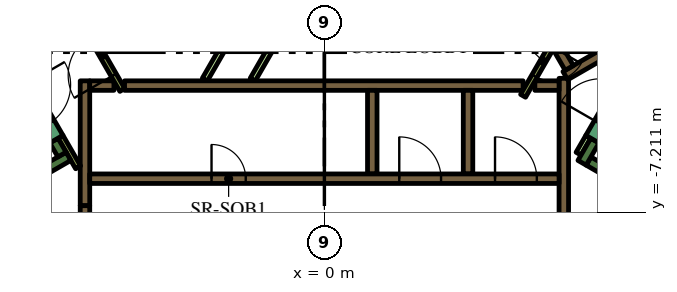
"""IFC4 building model, lengths in metres.
Left out: names, types, materials, properties, quantities, classifications, styles, units other than length and angle.
Written with IfcOpenShell. Run it as: python <this file> out.ifc"""

import sys

from ifc_helpers import new_model, si_unit, direction, frame, frame_2d, origin, place, context, subcontext, project, spatial, rectangle, extrude, element, fill, save


model = new_model("IFC4")
c1 = context("Model", 3, precision=1e-05, world=origin(), true_north=direction((0.0, 1.0)))
c2 = subcontext(c1, "Body", "Model", "MODEL_VIEW")
j1 = project(units=[si_unit("LENGTHUNIT", "METRE"), si_unit("PLANEANGLEUNIT", "RADIAN")], contexts=[c1])
p1 = place(None, origin())
s1 = spatial("IfcSite", under=j1, at=p1, CompositionType="ELEMENT")
p2 = place(p1, origin())
s2 = spatial("IfcBuilding", under=s1, at=p2, CompositionType="ELEMENT")
p3 = place(p2, frame((0.0, 0.0, 74.4)))
s3 = spatial("IfcBuildingStorey", under=s2, at=p3, CompositionType="ELEMENT", Elevation=74.4)
p4 = place(p3, frame((6.461, 13.909, 0.0), z_axis=(0.0, 0.0, 1.0), x_axis=(0.500005804227, -0.866022052686, 0.0)))
e1 = element("IfcWall", 1, at=p4, inside=s3, PredefinedType="SOLIDWALL", context=c2, shape_type="SweptSolid", body=[
    extrude(rectangle(XDim=20.834, YDim=0.9, at=frame_2d((10.417, 0.0))), origin(), (0.0, 0.0, 1.0), 3.9),
])
p5 = place(p3, frame((12.84, -9.261, 0.0), z_axis=(0.0, 0.0, 1.0), x_axis=(-0.866013990052, 0.500019768644, 0.0)))
e2 = element("IfcWall", 2, at=p5, inside=s3, PredefinedType="SOLIDWALL", context=c2, shape_type="SweptSolid", body=[
    extrude(rectangle(XDim=6.8, YDim=0.25, at=frame_2d((3.4, 0.0))), origin(), (0.0, 0.0, 1.0), 3.9),
])
p6 = place(p3, frame((6.78, -5.906, 0.0), z_axis=(0.0, 0.0, 1.0), x_axis=(0.500223362819, 0.865896406789, 0.0)))
e3 = element("IfcWall", 3, at=p6, inside=s3, PredefinedType="SOLIDWALL", context=c2, shape_type="SweptSolid", body=[
    extrude(rectangle(XDim=0.675, YDim=0.25, at=frame_2d((0.337, 0.0))), origin(), (0.0, 0.0, 1.0), 3.9),
])
p7 = place(p3, frame((-12.84, -9.261, 0.0), z_axis=(0.0, 0.0, 1.0), x_axis=(0.866016039709, 0.500016218704, 0.0)))
e4 = element("IfcWall", 4, at=p7, inside=s3, PredefinedType="SOLIDWALL", context=c2, shape_type="SweptSolid", body=[
    extrude(rectangle(XDim=7.05, YDim=0.25, at=frame_2d((3.525, 0.0))), origin(), (0.0, 0.0, 1.0), 3.9),
])
p8 = place(p3, frame((-6.905, -5.69, 0.0), z_axis=(0.0, 0.0, 1.0), x_axis=(-0.500402024738, 0.865793170242, 0.0)))
e5 = element("IfcWall", 5, at=p8, inside=s3, PredefinedType="SOLIDWALL", context=c2, shape_type="SweptSolid", body=[
    extrude(rectangle(XDim=0.425, YDim=0.25, at=frame_2d((0.212, 0.0))), origin(), (0.0, 0.0, 1.0), 3.9),
])
p9 = place(p3, frame((-5.259, -3.875, 0.0), z_axis=(0.0, 0.0, 1.0), x_axis=(1.0, 0.0, 0.0)))
e6 = element("IfcWall", 6, at=p9, inside=s3, PredefinedType="SOLIDWALL", context=c2, shape_type="SweptSolid", body=[
    extrude(rectangle(XDim=10.489, YDim=0.25, at=frame_2d((5.244, 0.0))), origin(), (0.0, 0.0, 1.0), 3.9),
])
for number, where, z_axis, x_axis in (
    (7, (3.78, -4.0, 0.0), (0.0, 0.0, 1.0), (0.0, -1.0, 0.0)),
    (8, (1.26, -4.0, 0.0), (0.0, 0.0, 1.0), (0.0, -1.0, 0.0)),
):
    element("IfcWall", number, at=place(p3, frame(where, z_axis=z_axis, x_axis=x_axis)), inside=s3, PredefinedType="SOLIDWALL", context=c2, shape_type="SweptSolid", body=[
        extrude(rectangle(XDim=2.2, YDim=0.25, at=frame_2d((1.1, 0.0))), origin(), (0.0, 0.0, 1.0), 3.9),
    ])
p10 = place(p3, frame((-6.3, -7.035, 0.0), z_axis=(0.0, 0.0, 1.0), x_axis=(0.0, 1.0, 0.0)))
e9 = element("IfcWall", 9, at=p10, inside=s3, PredefinedType="SOLIDWALL", context=c2, shape_type="SweptSolid", body=[
    extrude(rectangle(XDim=3.285, YDim=0.25, at=frame_2d((1.643, 0.0))), origin(), (0.0, 0.0, 1.0), 3.9),
])
p11 = place(p3, frame((-6.175, -3.875, 0.0), z_axis=(0.0, 0.0, 1.0), x_axis=(1.0, 0.0, 0.0)))
e10 = element("IfcWall", 10, at=p11, inside=s3, PredefinedType="SOLIDWALL", context=c2, shape_type="SweptSolid", body=[
    extrude(rectangle(XDim=0.637, YDim=0.25, at=frame_2d((0.318, 0.0))), origin(), (0.0, 0.0, 1.0), 3.9),
])
p12 = place(p3, frame((6.3, -7.27, 0.0), z_axis=(0.0, 0.0, 1.0), x_axis=(0.0, 1.0, 0.0)))
e11 = element("IfcWall", 11, at=p12, inside=s3, PredefinedType="SOLIDWALL", context=c2, shape_type="SweptSolid", body=[
    extrude(rectangle(XDim=3.586, YDim=0.25, at=frame_2d((1.793, 0.0))), origin(), (0.0, 0.0, 1.0), 3.9),
])
p13 = place(p3, frame((5.538, -3.875, 0.0), z_axis=(0.0, 0.0, 1.0), x_axis=(1.0, 0.0, 0.0)))
e12 = element("IfcWall", 12, at=p13, inside=s3, PredefinedType="SOLIDWALL", context=c2, shape_type="SweptSolid", body=[
    extrude(rectangle(XDim=0.637, YDim=0.25, at=frame_2d((0.318, 0.0))), origin(), (0.0, 0.0, 1.0), 3.9),
])
p14 = place(p3, frame((9.346, -1.879, 0.0), z_axis=(0.0, 0.0, 1.0), x_axis=(-0.866048528039, -0.499959945477, 0.0)))
e13 = element("IfcWall", 13, at=p14, inside=s3, PredefinedType="SOLIDWALL", context=c2, shape_type="SweptSolid", body=[
    extrude(rectangle(XDim=3.47, YDim=0.25, at=frame_2d((1.735, 0.0))), origin(), (0.0, 0.0, 1.0), 3.9),
])
p15 = place(p3, frame((6.13, -2.867, 0.0), z_axis=(0.0, 0.0, 1.0), x_axis=(0.500160776593, -0.865932559475, 0.0)))
e14 = element("IfcWall", 14, at=p15, inside=s3, PredefinedType="SOLIDWALL", context=c2, shape_type="SweptSolid", body=[
    extrude(rectangle(XDim=0.627, YDim=0.25, at=frame_2d((0.313, 0.0))), origin(), (0.0, 0.0, 1.0), 3.9),
])
p16 = place(p3, frame((-6.48, -6.027, 0.0), z_axis=(0.0, 0.0, 1.0), x_axis=(-0.499927229454, 0.866067413802, 0.0)))
e15 = element("IfcWall", 15, at=p16, inside=s3, PredefinedType="PARTITIONING", context=c2, shape_type="SweptSolid", body=[
    extrude(rectangle(XDim=0.929, YDim=0.15, at=frame_2d((0.464, 0.0))), origin(), (0.0, 0.0, 1.0), 3.9),
])
p17 = place(p3, frame((-3.147, -3.718, 0.0), z_axis=(0.0, 0.0, 1.0), x_axis=(0.500010131483, 0.866019554291, 0.0)))
e16 = element("IfcWall", 16, at=p17, inside=s3, PredefinedType="PARTITIONING", context=c2, shape_type="SweptSolid", body=[
    extrude(rectangle(XDim=3.894, YDim=0.15, at=frame_2d((1.947, 0.0))), origin(), (0.0, 0.0, 1.0), 2.7),
])
p18 = place(p3, frame((6.945, -5.222, 0.0), z_axis=(0.0, 0.0, 1.0), x_axis=(-0.499818422106, -0.866130212453, 0.0)))
e17 = element("IfcWall", 17, at=p18, inside=s3, PredefinedType="PARTITIONING", context=c2, shape_type="SweptSolid", body=[
    extrude(rectangle(XDim=0.514, YDim=0.15, at=frame_2d((0.257, 0.0))), origin(), (0.0, 0.0, 1.0), 2.7),
])
p19 = place(p3, frame((-1.887, -3.718, 0.0), z_axis=(0.0, 0.0, 1.0), x_axis=(0.500005008002, 0.866022512394, 0.0)))
e18 = element("IfcWall", 18, at=p19, inside=s3, PredefinedType="PARTITIONING", context=c2, shape_type="SweptSolid", body=[
    extrude(rectangle(XDim=8.327, YDim=0.15, at=frame_2d((4.164, 0.0))), origin(), (0.0, 0.0, 1.0), 2.7),
])
p20 = place(p3, frame((-6.175, -6.325, 0.0), z_axis=(0.0, 0.0, 1.0), x_axis=(1.0, 0.0, 0.0)))
e19 = element("IfcWall", 19, at=p20, inside=s3, PredefinedType="SOLIDWALL", context=c2, shape_type="SweptSolid", body=[
    extrude(rectangle(XDim=12.35, YDim=0.25, at=frame_2d((6.175, 0.0))), origin(), (0.0, 0.0, 1.0), 3.9),
])
p21 = place(p20, frame((3.205, 0.0, 0.0)))
e20 = element("IfcOpeningElement", 20, at=p21, cuts=e19, PredefinedType="OPENING", context=c2, shape_type="SweptSolid", body=[
    extrude(rectangle(XDim=0.9, YDim=2.1, at=frame_2d((0.45, 1.05))), frame((0.0, 0.135, 0.0), z_axis=(0.0, -1.0, 0.0), x_axis=(1.0, 0.0, 0.0)), (0.0, 0.0, 1.0), 0.27),
])
p22 = place(p20, frame((8.145, 0.0, 0.0)))
e21 = element("IfcOpeningElement", 21, at=p22, cuts=e19, PredefinedType="OPENING", context=c2, shape_type="SweptSolid", body=[
    extrude(rectangle(XDim=1.1, YDim=2.1, at=frame_2d((0.55, 1.05))), frame((0.0, 0.135, 0.0), z_axis=(0.0, -1.0, 0.0), x_axis=(1.0, 0.0, 0.0)), (0.0, 0.0, 1.0), 0.27),
])
p23 = place(p20, frame((10.665, 0.0, 0.0)))
e22 = element("IfcOpeningElement", 22, at=p23, cuts=e19, PredefinedType="OPENING", context=c2, shape_type="SweptSolid", body=[
    extrude(rectangle(XDim=1.1, YDim=2.1, at=frame_2d((0.55, 1.05))), frame((0.0, 0.135, 0.0), z_axis=(0.0, -1.0, 0.0), x_axis=(1.0, 0.0, 0.0)), (0.0, 0.0, 1.0), 0.27),
])
p24 = place(p3, frame((7.053, -5.284, 0.0), z_axis=(0.0, 0.0, 1.0), x_axis=(0.500078061341, 0.865980330357, 0.0)))
e23 = element("IfcWall", 23, at=p24, inside=s3, PredefinedType="SOLIDWALL", context=c2, shape_type="SweptSolid", body=[
    extrude(rectangle(XDim=2.1, YDim=0.4, at=frame_2d((1.05, 0.0))), origin(), (0.0, 0.0, 1.0), 3.9),
])
p25 = place(p24, frame((0.45, 0.0, 0.0)))
e24 = element("IfcOpeningElement", 24, at=p25, cuts=e23, PredefinedType="OPENING", context=c2, shape_type="SweptSolid", body=[
    extrude(rectangle(XDim=1.2, YDim=2.1, at=frame_2d((0.6, 1.05))), frame((0.0, 0.21, 0.0), z_axis=(0.0, -1.0, 0.0), x_axis=(1.0, 0.0, 0.0)), (0.0, 0.0, 1.0), 0.42),
])
p26 = place(p3, frame((-8.103, -3.466, 0.0), z_axis=(0.0, 0.0, 1.0), x_axis=(0.500078061341, -0.865980330357, 0.0)))
e25 = element("IfcWall", 25, at=p26, inside=s3, PredefinedType="SOLIDWALL", context=c2, shape_type="SweptSolid", body=[
    extrude(rectangle(XDim=2.1, YDim=0.4, at=frame_2d((1.05, 0.0))), origin(), (0.0, 0.0, 1.0), 3.9),
])
p27 = place(p26, frame((0.45, 0.0, 0.0)))
e26 = element("IfcOpeningElement", 26, at=p27, cuts=e25, PredefinedType="OPENING", context=c2, shape_type="SweptSolid", body=[
    extrude(rectangle(XDim=1.2, YDim=2.1, at=frame_2d((0.6, 1.05))), frame((0.0, 0.21, 0.0), z_axis=(0.0, -1.0, 0.0), x_axis=(1.0, 0.0, 0.0)), (0.0, 0.0, 1.0), 0.42),
])
p28 = place(p3, frame((-6.3, -7.035, 0.0), z_axis=(0.0, 0.0, 1.0), x_axis=(0.0, -1.0, 0.0)))
e27 = element("IfcWall", 27, at=p28, inside=s3, PredefinedType="SOLIDWALL", context=c2, shape_type="SweptSolid", body=[
    extrude(rectangle(XDim=1.8, YDim=0.25, at=frame_2d((0.9, 0.0))), origin(), (0.0, 0.0, 1.0), 3.9),
])
p29 = place(p28, frame((0.45, 0.0, 0.0)))
e28 = element("IfcOpeningElement", 28, at=p29, cuts=e27, PredefinedType="OPENING", context=c2, shape_type="SweptSolid", body=[
    extrude(rectangle(XDim=0.9, YDim=2.1, at=frame_2d((0.45, 1.05))), frame((0.0, 0.135, 0.0), z_axis=(0.0, -1.0, 0.0), x_axis=(1.0, 0.0, 0.0)), (0.0, 0.0, 1.0), 0.27),
])
p30 = place(p3, frame((6.203, -2.456, 0.0), z_axis=(0.0, 0.0, 1.0), x_axis=(-0.500043961785, -0.866000020948, 0.0)))
e29 = element("IfcWall", 29, at=p30, inside=s3, PredefinedType="PARTITIONING", context=c2, shape_type="SweptSolid", body=[
    extrude(rectangle(XDim=1.95, YDim=0.15, at=frame_2d((0.975, 0.0))), origin(), (0.0, 0.0, 1.0), 3.9),
])
p31 = place(p30, frame((0.45, 0.0, 0.0)))
e30 = element("IfcOpeningElement", 30, at=p31, cuts=e29, PredefinedType="OPENING", context=c2, shape_type="SweptSolid", body=[
    extrude(rectangle(XDim=0.9, YDim=2.1, at=frame_2d((0.45, 1.05))), frame((0.0, 0.085, 0.0), z_axis=(0.0, -1.0, 0.0), x_axis=(1.0, 0.0, 0.0)), (0.0, 0.0, 1.0), 0.17),
])
p32 = place(p3, frame((-5.317, -3.99, 0.0), z_axis=(0.0, 0.0, 1.0), x_axis=(-0.500027713859, 0.866009402589, 0.0)))
e31 = element("IfcWall", 31, at=p32, inside=s3, PredefinedType="PARTITIONING", context=c2, shape_type="SweptSolid", body=[
    extrude(rectangle(XDim=2.1, YDim=0.15, at=frame_2d((1.05, 0.0))), origin(), (0.0, 0.0, 1.0), 3.9),
])
p33 = place(p32, frame((0.45, 0.0, 0.0)))
e32 = element("IfcOpeningElement", 32, at=p33, cuts=e31, PredefinedType="OPENING", context=c2, shape_type="SweptSolid", body=[
    extrude(rectangle(XDim=1.2, YDim=2.1, at=frame_2d((0.6, 1.05))), frame((0.0, 0.085, 0.0), z_axis=(0.0, -1.0, 0.0), x_axis=(1.0, 0.0, 0.0)), (0.0, 0.0, 1.0), 0.17),
])
p34 = place(p3, frame((6.163, 18.475, 0.0), z_axis=(0.0, 0.0, 1.0), x_axis=(0.500001317485, -0.866024643133, 0.0)))
e33 = element("IfcWall", 33, at=p34, inside=s3, PredefinedType="PARTITIONING", context=c2, shape_type="SweptSolid", body=[
    extrude(rectangle(XDim=25.767, YDim=0.15, at=frame_2d((12.883, 0.0))), origin(), (0.0, 0.0, 1.0), 2.7),
])
p35 = place(p34, frame((21.953, 0.0, 0.0)))
e34 = element("IfcOpeningElement", 34, at=p35, cuts=e33, PredefinedType="OPENING", context=c2, shape_type="SweptSolid", body=[
    extrude(rectangle(XDim=1.0, YDim=2.1, at=frame_2d((0.5, 1.05))), frame((0.0, 0.085, 0.0), z_axis=(0.0, -1.0, 0.0), x_axis=(1.0, 0.0, 0.0)), (0.0, 0.0, 1.0), 0.17),
])
p36 = place(p34, frame((9.948, 0.0, 0.0)))
e35 = element("IfcOpeningElement", 35, at=p36, cuts=e33, PredefinedType="OPENING", context=c2, shape_type="SweptSolid", body=[
    extrude(rectangle(XDim=1.0, YDim=2.1, at=frame_2d((0.5, 1.05))), frame((0.0, 0.085, 0.0), z_axis=(0.0, -1.0, 0.0), x_axis=(1.0, 0.0, 0.0)), (0.0, 0.0, 1.0), 0.17),
])
p37 = place(p34, frame((8.641, 0.0, 0.0)))
e36 = element("IfcOpeningElement", 36, at=p37, cuts=e33, PredefinedType="OPENING", context=c2, shape_type="SweptSolid", body=[
    extrude(rectangle(XDim=1.0, YDim=2.1, at=frame_2d((0.5, 1.05))), frame((0.0, 0.085, 0.0), z_axis=(0.0, -1.0, 0.0), x_axis=(1.0, 0.0, 0.0)), (0.0, 0.0, 1.0), 0.17),
])
p38 = place(p3, frame((-19.081, -3.9, 0.0), z_axis=(0.0, 0.0, 1.0), x_axis=(0.499998313975, 0.866026377209, 0.0)))
e37 = element("IfcWall", 37, at=p38, inside=s3, PredefinedType="PARTITIONING", context=c2, shape_type="SweptSolid", body=[
    extrude(rectangle(XDim=25.766, YDim=0.15, at=frame_2d((12.883, 0.0))), origin(), (0.0, 0.0, 1.0), 2.7),
])
p39 = place(p38, frame((24.265, 0.0, 0.0)))
e38 = element("IfcOpeningElement", 38, at=p39, cuts=e37, PredefinedType="OPENING", context=c2, shape_type="SweptSolid", body=[
    extrude(rectangle(XDim=1.0, YDim=2.1, at=frame_2d((0.5, 1.05))), frame((0.0, 0.085, 0.0), z_axis=(0.0, -1.0, 0.0), x_axis=(1.0, 0.0, 0.0)), (0.0, 0.0, 1.0), 0.17),
])
p40 = place(p38, frame((13.146, 0.0, 0.0)))
e39 = element("IfcOpeningElement", 39, at=p40, cuts=e37, PredefinedType="OPENING", context=c2, shape_type="SweptSolid", body=[
    extrude(rectangle(XDim=1.1, YDim=2.1, at=frame_2d((0.55, 1.05))), frame((0.0, 0.085, 0.0), z_axis=(0.0, -1.0, 0.0), x_axis=(1.0, 0.0, 0.0)), (0.0, 0.0, 1.0), 0.17),
])
p41 = place(p38, frame((11.693, 0.0, 0.0)))
e40 = element("IfcOpeningElement", 40, at=p41, cuts=e37, PredefinedType="OPENING", context=c2, shape_type="SweptSolid", body=[
    extrude(rectangle(XDim=1.0, YDim=2.1, at=frame_2d((0.5, 1.05))), frame((0.0, 0.085, 0.0), z_axis=(0.0, -1.0, 0.0), x_axis=(1.0, 0.0, 0.0)), (0.0, 0.0, 1.0), 0.17),
])
p42 = place(p38, frame((0.18, 0.0, 0.0)))
e41 = element("IfcOpeningElement", 41, at=p42, cuts=e37, PredefinedType="OPENING", context=c2, shape_type="SweptSolid", body=[
    extrude(rectangle(XDim=1.0, YDim=2.1, at=frame_2d((0.5, 1.05))), frame((0.0, 0.085, 0.0), z_axis=(0.0, -1.0, 0.0), x_axis=(1.0, 0.0, 0.0)), (0.0, 0.0, 1.0), 0.17),
])
p43 = place(p21, origin())
e42 = element("IfcDoor", 42, at=p43, inside=s3, OperationType="SINGLE_SWING_LEFT", PredefinedType="DOOR", context=c2, shape_type="SweptSolid", body=[
    extrude(rectangle(XDim=0.9, YDim=2.1, at=frame_2d((0.45, 1.05))), frame((0.0, 0.025, 0.0), z_axis=(0.0, -1.0, 0.0), x_axis=(1.0, 0.0, 0.0)), (0.0, 0.0, 1.0), 0.05),
])
fill(e20, e42)
p44 = place(p22, origin())
e43 = element("IfcDoor", 43, at=p44, inside=s3, OperationType="DOUBLE_DOOR_SLIDING", PredefinedType="DOOR", context=c2, shape_type="SweptSolid", body=[
    extrude(rectangle(XDim=1.1, YDim=2.1, at=frame_2d((0.55, 1.05))), frame((0.0, 0.025, 0.0), z_axis=(0.0, -1.0, 0.0), x_axis=(1.0, 0.0, 0.0)), (0.0, 0.0, 1.0), 0.05),
])
fill(e21, e43)
p45 = place(p23, origin())
e44 = element("IfcDoor", 44, at=p45, inside=s3, OperationType="DOUBLE_DOOR_SLIDING", PredefinedType="DOOR", context=c2, shape_type="SweptSolid", body=[
    extrude(rectangle(XDim=1.1, YDim=2.1, at=frame_2d((0.55, 1.05))), frame((0.0, 0.025, 0.0), z_axis=(0.0, -1.0, 0.0), x_axis=(1.0, 0.0, 0.0)), (0.0, 0.0, 1.0), 0.05),
])
fill(e22, e44)
p46 = place(p31, origin())
e45 = element("IfcDoor", 45, at=p46, inside=s3, OperationType="SINGLE_SWING_LEFT", PredefinedType="DOOR", context=c2, shape_type="SweptSolid", body=[
    extrude(rectangle(XDim=0.9, YDim=2.1, at=frame_2d((0.45, 1.05))), frame((0.0, 0.025, 0.0), z_axis=(0.0, -1.0, 0.0), x_axis=(1.0, 0.0, 0.0)), (0.0, 0.0, 1.0), 0.05),
])
fill(e30, e45)
p47 = place(p33, origin())
e46 = element("IfcDoor", 46, at=p47, inside=s3, OperationType="SINGLE_SWING_LEFT", PredefinedType="DOOR", context=c2, shape_type="SweptSolid", body=[
    extrude(rectangle(XDim=1.2, YDim=2.1, at=frame_2d((0.6, 1.05))), frame((0.0, 0.025, 0.0), z_axis=(0.0, -1.0, 0.0), x_axis=(1.0, 0.0, 0.0)), (0.0, 0.0, 1.0), 0.05),
])
fill(e32, e46)
save(model, sys.argv[1])
